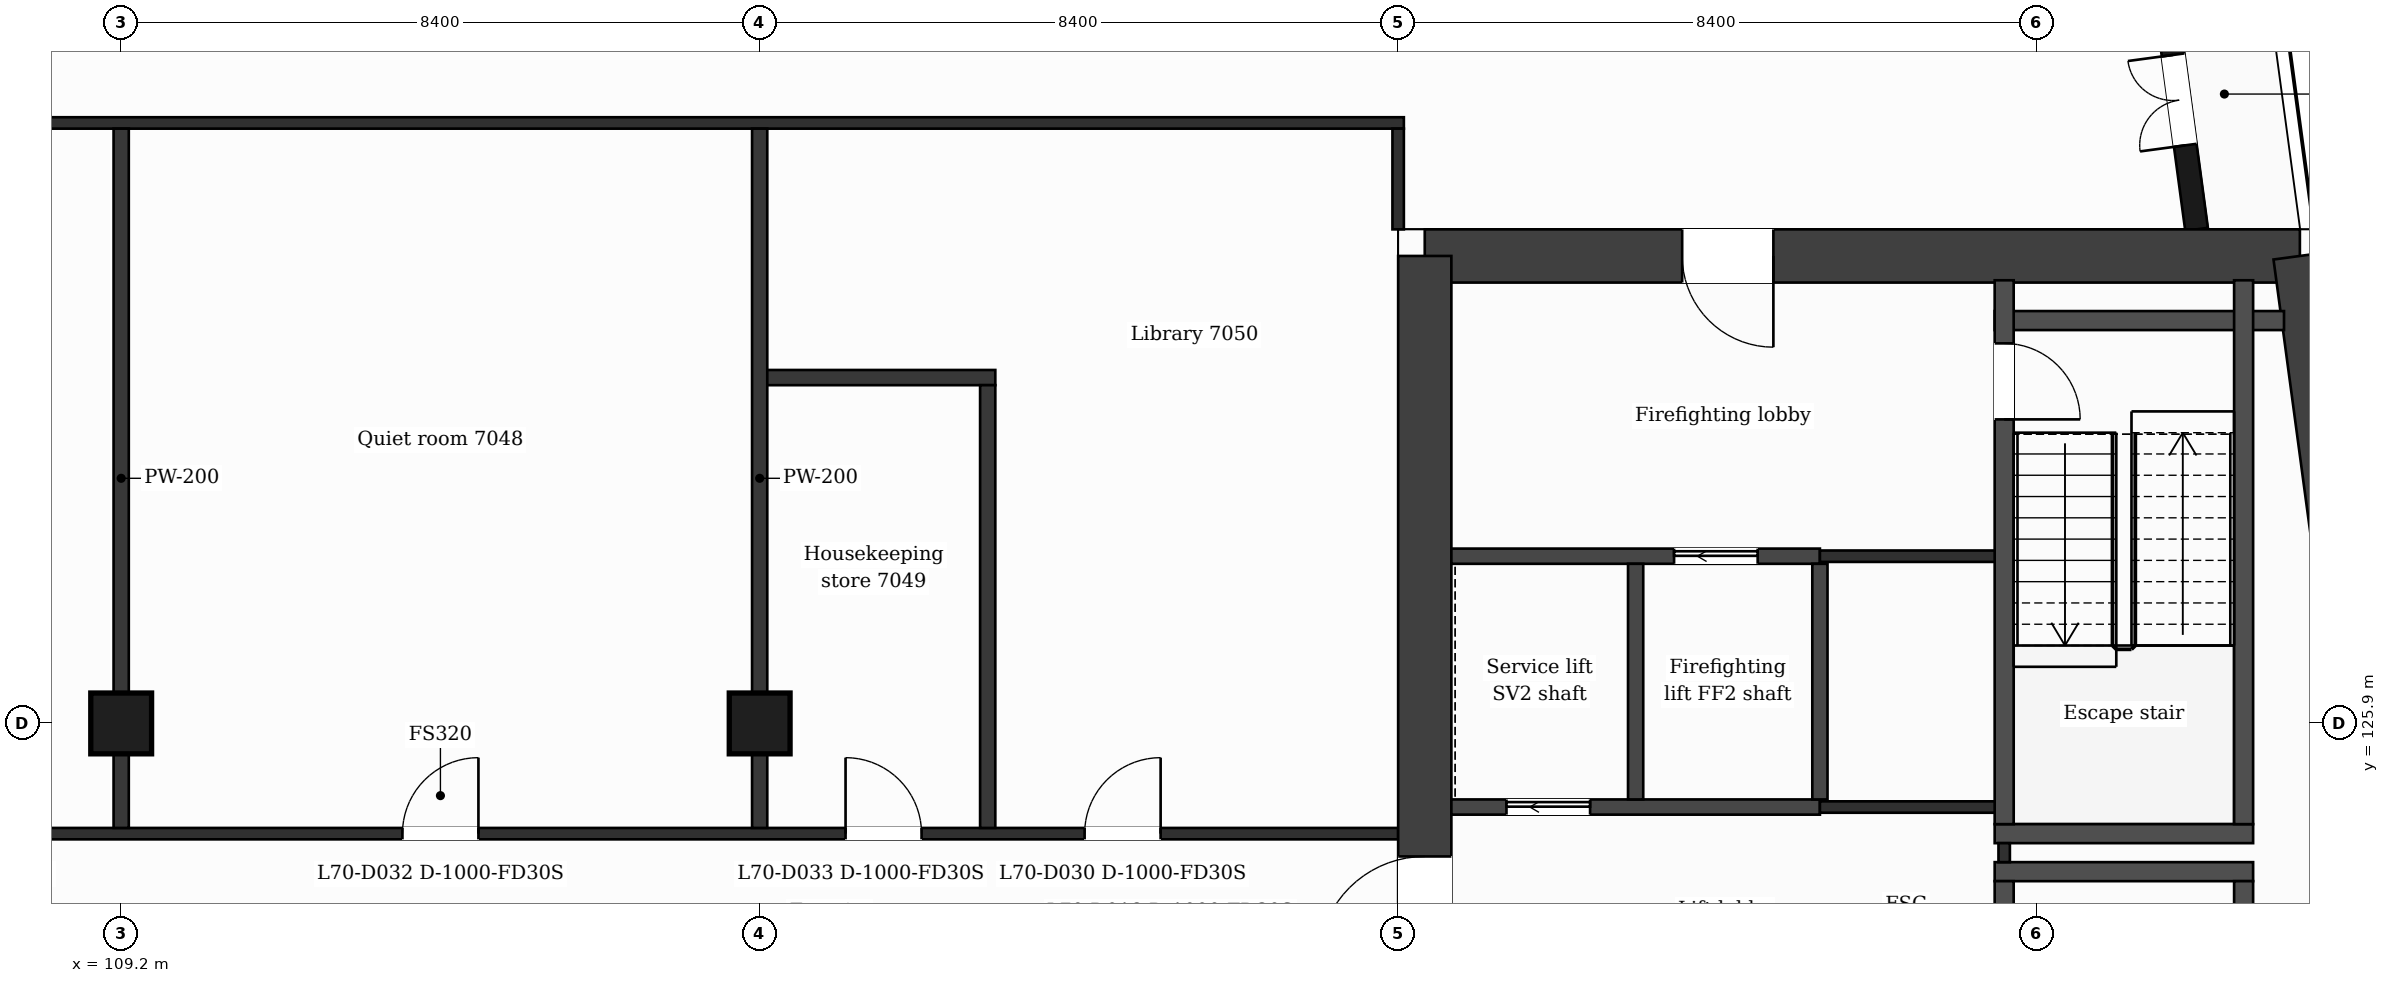
"""IFC4 building model, lengths in metres.
Left out: names, types, materials, properties, quantities, classifications, styles, units other than length and angle.
Written with IfcOpenShell. Run it as: python <this file> out.ifc"""

import sys

from ifc_helpers import new_model, si_unit, direction, frame, frame_2d, origin, origin_2d, place, context, subcontext, project, spatial, rectangle, extrude, element, fill, save


model = new_model("IFC4")
c1 = context("Model", 3, precision=1e-05, world=origin(), true_north=direction((0.0, 1.0)))
c2 = subcontext(c1, "Body", "Model", "MODEL_VIEW")
j1 = project(units=[si_unit("LENGTHUNIT", "METRE"), si_unit("PLANEANGLEUNIT", "RADIAN")], contexts=[c1])
p1 = place(None, origin())
s1 = spatial("IfcSite", under=j1, at=p1, CompositionType="ELEMENT")
p2 = place(p1, origin())
s2 = spatial("IfcBuilding", under=s1, at=p2, CompositionType="ELEMENT")
p3 = place(p2, frame((0.0, 0.0, 288.6)))
s3 = spatial("IfcBuildingStorey", under=s2, at=p3, CompositionType="ELEMENT", Elevation=288.6)
p4 = place(p3, frame((126.35, 132.05, 0.0), z_axis=(0.0, 0.0, 1.0), x_axis=(1.0, 0.0, 0.0)))
e1 = element("IfcWall", 1, at=p4, inside=s3, PredefinedType="SHEAR", context=c2, shape_type="SweptSolid", body=[
    extrude(rectangle(XDim=11.513, YDim=0.7, at=frame_2d((5.757, 0.0))), origin(), (0.0, 0.0, 1.0), 3.7),
])
p5 = place(p4, frame((3.386, 0.0, 0.0)))
e2 = element("IfcOpeningElement", 2, at=p5, cuts=e1, PredefinedType="OPENING", context=c2, shape_type="SweptSolid", body=[
    extrude(rectangle(XDim=1.2, YDim=2.1, at=frame_2d((0.6, 1.05))), frame((0.0, 0.36, 0.0), z_axis=(0.0, -1.0, 0.0), x_axis=(1.0, 0.0, 0.0)), (0.0, 0.0, 1.0), 0.72),
])
p6 = place(p3, frame((137.863, 132.05, 0.0), z_axis=(0.0, 0.0, 1.0), x_axis=(0.133401241494, -0.991062111458, 0.0)))
e3 = element("IfcWall", 3, at=p6, inside=s3, PredefinedType="SHEAR", context=c2, shape_type="SweptSolid", body=[
    extrude(rectangle(XDim=15.842, YDim=0.7, at=frame_2d((7.921, 0.0))), origin(), (0.0, 0.0, 1.0), 3.7),
])
p7 = place(p3, frame((126.35, 116.35, 0.0), z_axis=(0.0, 0.0, 1.0), x_axis=(0.0, 1.0, 0.0)))
e4 = element("IfcWall", 4, at=p7, inside=s3, PredefinedType="SHEAR", context=c2, shape_type="SweptSolid", body=[
    extrude(rectangle(XDim=15.7, YDim=0.7, at=frame_2d((7.85, 0.0))), origin(), (0.0, 0.0, 1.0), 3.7),
])
p8 = place(p7, frame((6.4, 0.0, 0.0)))
e5 = element("IfcOpeningElement", 5, at=p8, cuts=e4, PredefinedType="OPENING", context=c2, shape_type="SweptSolid", body=[
    extrude(rectangle(XDim=1.4, YDim=2.1, at=frame_2d((0.7, 1.05))), frame((0.0, 0.36, 0.0), z_axis=(0.0, -1.0, 0.0), x_axis=(1.0, 0.0, 0.0)), (0.0, 0.0, 1.0), 0.72),
])
for number, where, z_axis, x_axis in (
    (6, (109.2, 125.9, 0.0), (0.0, 0.0, 1.0), (1.0, 0.0, 0.0)),
    (7, (117.6, 125.9, 0.0), (0.0, 0.0, 1.0), (1.0, 0.0, 0.0)),
):
    element("IfcColumn", number, at=place(p3, frame(where, z_axis=z_axis, x_axis=x_axis)), inside=s3, PredefinedType="COLUMN", context=c2, shape_type="SweptSolid", body=[
        extrude(rectangle(XDim=0.8, YDim=0.8, at=origin_2d()), origin(), (0.0, 0.0, 1.0), 3.7),
    ])
p9 = place(p3, frame((136.504, 132.4, 0.0), z_axis=(0.0, 0.0, 1.0), x_axis=(-0.133399697462, 0.99106231929, 0.0)))
e8 = element("IfcWall", 8, at=p9, inside=s3, PredefinedType="SOLIDWALL", context=c2, shape_type="SweptSolid", body=[
    extrude(rectangle(XDim=6.74, YDim=0.3, at=frame_2d((3.37, 0.0))), origin(), (0.0, 0.0, 1.0), 3.38),
])
p10 = place(p9, frame((1.115, 0.0, 0.0)))
e9 = element("IfcOpeningElement", 9, at=p10, cuts=e8, PredefinedType="OPENING", context=c2, shape_type="SweptSolid", body=[
    extrude(rectangle(XDim=1.2, YDim=2.4, at=frame_2d((0.6, 1.2))), frame((0.0, 0.16, 0.0), z_axis=(0.0, -1.0, 0.0), x_axis=(1.0, 0.0, 0.0)), (0.0, 0.0, 1.0), 0.32),
])
p11 = place(p9, frame((3.835, 0.0, 0.9)))
e10 = element("IfcOpeningElement", 10, at=p11, cuts=e8, PredefinedType="OPENING", context=c2, shape_type="SweptSolid", body=[
    extrude(rectangle(XDim=2.4, YDim=2.1, at=frame_2d((1.2, 1.05))), frame((0.0, 0.16, 0.0), z_axis=(0.0, -1.0, 0.0), x_axis=(1.0, 0.0, 0.0)), (0.0, 0.0, 1.0), 0.32),
])
for number, where, z_axis, x_axis in (
    (11, (133.848, 123.95, 0.0), (0.0, 0.0, 1.0), (1.0, 0.0, 0.0)),
    (12, (133.848, 124.45, 0.0), (0.0, 0.0, 1.0), (1.0, 0.0, 0.0)),
):
    element("IfcWall", number, at=place(p3, frame(where, z_axis=z_axis, x_axis=x_axis)), inside=s3, PredefinedType="PARTITIONING", context=c2, shape_type="SweptSolid", body=[
        extrude(rectangle(XDim=3.4, YDim=0.25, at=frame_2d((1.7, 0.0))), origin(), (0.0, 0.0, 1.0), 3.38),
    ])
p12 = place(p3, frame((100.8, 124.45, 0.0), z_axis=(0.0, 0.0, 1.0), x_axis=(1.0, 0.0, 0.0)))
e13 = element("IfcWall", 13, at=p12, inside=s3, PredefinedType="PARTITIONING", context=c2, shape_type="SweptSolid", body=[
    extrude(rectangle(XDim=25.2, YDim=0.15, at=frame_2d((12.6, 0.0))), origin(), (0.0, 0.0, 1.0), 3.38),
])
p13 = place(p12, frame((21.075, 0.0, 0.0)))
e14 = element("IfcOpeningElement", 14, at=p13, cuts=e13, PredefinedType="OPENING", context=c2, shape_type="SweptSolid", body=[
    extrude(rectangle(XDim=1.0, YDim=2.1, at=frame_2d((0.5, 1.05))), frame((0.0, 0.085, 0.0), z_axis=(0.0, -1.0, 0.0), x_axis=(1.0, 0.0, 0.0)), (0.0, 0.0, 1.0), 0.17),
])
p14 = place(p12, frame((5.375, 0.0, 0.0)))
e15 = element("IfcOpeningElement", 15, at=p14, cuts=e13, PredefinedType="OPENING", context=c2, shape_type="SweptSolid", body=[
    extrude(rectangle(XDim=1.0, YDim=2.1, at=frame_2d((0.5, 1.05))), frame((0.0, 0.085, 0.0), z_axis=(0.0, -1.0, 0.0), x_axis=(1.0, 0.0, 0.0)), (0.0, 0.0, 1.0), 0.17),
])
p15 = place(p12, frame((12.1, 0.0, 0.0)))
e16 = element("IfcOpeningElement", 16, at=p15, cuts=e13, PredefinedType="OPENING", context=c2, shape_type="SweptSolid", body=[
    extrude(rectangle(XDim=1.0, YDim=2.1, at=frame_2d((0.5, 1.05))), frame((0.0, 0.085, 0.0), z_axis=(0.0, -1.0, 0.0), x_axis=(1.0, 0.0, 0.0)), (0.0, 0.0, 1.0), 0.17),
])
p16 = place(p12, frame((17.93, 0.0, 0.0)))
e17 = element("IfcOpeningElement", 17, at=p16, cuts=e13, PredefinedType="OPENING", context=c2, shape_type="SweptSolid", body=[
    extrude(rectangle(XDim=1.0, YDim=2.1, at=frame_2d((0.5, 1.05))), frame((0.0, 0.085, 0.0), z_axis=(0.0, -1.0, 0.0), x_axis=(1.0, 0.0, 0.0)), (0.0, 0.0, 1.0), 0.17),
])
p17 = place(p3, frame((126.7, 124.8, 0.0), z_axis=(0.0, 0.0, 1.0), x_axis=(1.0, 0.0, 0.0)))
e18 = element("IfcWall", 18, at=p17, inside=s3, PredefinedType="PARTITIONING", context=c2, shape_type="SweptSolid", body=[
    extrude(rectangle(XDim=4.849, YDim=0.2, at=frame_2d((2.424, 0.0))), origin(), (0.0, 0.0, 1.0), 3.38),
])
p18 = place(p17, frame((0.725, 0.0, 0.0)))
e19 = element("IfcOpeningElement", 19, at=p18, cuts=e18, PredefinedType="OPENING", context=c2, shape_type="SweptSolid", body=[
    extrude(rectangle(XDim=1.1, YDim=2.1, at=frame_2d((0.55, 1.05))), frame((0.0, 0.11, 0.0), z_axis=(0.0, -1.0, 0.0), x_axis=(1.0, 0.0, 0.0)), (0.0, 0.0, 1.0), 0.22),
])
p19 = place(p3, frame((131.549, 124.8, 0.0), z_axis=(0.0, 0.0, 1.0), x_axis=(1.0, 0.0, 0.0)))
e20 = element("IfcWall", 20, at=p19, inside=s3, PredefinedType="PARTITIONING", context=c2, shape_type="SweptSolid", body=[
    extrude(rectangle(XDim=2.549, YDim=0.15, at=frame_2d((1.275, 0.0))), origin(), (0.0, 0.0, 1.0), 3.38),
])
p20 = place(p3, frame((126.7, 128.1, 0.0), z_axis=(0.0, 0.0, 1.0), x_axis=(1.0, 0.0, 0.0)))
e21 = element("IfcWall", 21, at=p20, inside=s3, PredefinedType="PARTITIONING", context=c2, shape_type="SweptSolid", body=[
    extrude(rectangle(XDim=4.849, YDim=0.2, at=frame_2d((2.424, 0.0))), origin(), (0.0, 0.0, 1.0), 3.38),
])
p21 = place(p20, frame((2.93, 0.0, 0.0)))
e22 = element("IfcOpeningElement", 22, at=p21, cuts=e21, PredefinedType="OPENING", context=c2, shape_type="SweptSolid", body=[
    extrude(rectangle(XDim=1.1, YDim=2.1, at=frame_2d((0.55, 1.05))), frame((0.0, 0.11, 0.0), z_axis=(0.0, -1.0, 0.0), x_axis=(1.0, 0.0, 0.0)), (0.0, 0.0, 1.0), 0.22),
])
p22 = place(p3, frame((131.549, 128.1, 0.0), z_axis=(0.0, 0.0, 1.0), x_axis=(1.0, 0.0, 0.0)))
e23 = element("IfcWall", 23, at=p22, inside=s3, PredefinedType="PARTITIONING", context=c2, shape_type="SweptSolid", body=[
    extrude(rectangle(XDim=2.424, YDim=0.15, at=frame_2d((1.212, 0.0))), origin(), (0.0, 0.0, 1.0), 3.38),
])
p23 = place(p3, frame((117.6, 130.45, 0.0), z_axis=(0.0, 0.0, 1.0), x_axis=(1.0, 0.0, 0.0)))
e24 = element("IfcWall", 24, at=p23, inside=s3, PredefinedType="PARTITIONING", context=c2, shape_type="SweptSolid", body=[
    extrude(rectangle(XDim=3.1, YDim=0.2, at=frame_2d((1.55, 0.0))), origin(), (0.0, 0.0, 1.0), 3.38),
])
p24 = place(p3, frame((133.848, 131.2, 0.0), z_axis=(0.0, 0.0, 1.0), x_axis=(1.0, 0.0, 0.0)))
e25 = element("IfcWall", 25, at=p24, inside=s3, PredefinedType="PARTITIONING", context=c2, shape_type="SweptSolid", body=[
    extrude(rectangle(XDim=3.807, YDim=0.25, at=frame_2d((1.903, 0.0))), origin(), (0.0, 0.0, 1.0), 3.38),
])
p25 = place(p3, frame((100.725, 133.8, 0.0), z_axis=(0.0, 0.0, 1.0), x_axis=(1.0, 0.0, 0.0)))
e26 = element("IfcWall", 26, at=p25, inside=s3, PredefinedType="PARTITIONING", context=c2, shape_type="SweptSolid", body=[
    extrude(rectangle(XDim=25.35, YDim=0.15, at=frame_2d((12.675, 0.0))), origin(), (0.0, 0.0, 1.0), 3.38),
])
for number, where, z_axis, x_axis in (
    (27, (109.2, 124.525, 0.0), (0.0, 0.0, 1.0), (0.0, 1.0, 0.0)),
    (28, (117.6, 124.525, 0.0), (0.0, 0.0, 1.0), (0.0, 1.0, 0.0)),
):
    element("IfcWall", number, at=place(p3, frame(where, z_axis=z_axis, x_axis=x_axis)), inside=s3, PredefinedType="PARTITIONING", context=c2, shape_type="SweptSolid", body=[
        extrude(rectangle(XDim=9.2, YDim=0.2, at=frame_2d((4.6, 0.0))), origin(), (0.0, 0.0, 1.0), 3.38),
    ])
p26 = place(p3, frame((120.6, 124.525, 0.0), z_axis=(0.0, 0.0, 1.0), x_axis=(0.0, 1.0, 0.0)))
e29 = element("IfcWall", 29, at=p26, inside=s3, PredefinedType="PARTITIONING", context=c2, shape_type="SweptSolid", body=[
    extrude(rectangle(XDim=5.825, YDim=0.2, at=frame_2d((2.913, 0.0))), origin(), (0.0, 0.0, 1.0), 3.38),
])
p27 = place(p3, frame((126.0, 132.4, 0.0), z_axis=(0.0, 0.0, 1.0), x_axis=(0.0, 1.0, 0.0)))
e30 = element("IfcWall", 30, at=p27, inside=s3, PredefinedType="PARTITIONING", context=c2, shape_type="SweptSolid", body=[
    extrude(rectangle(XDim=1.325, YDim=0.15, at=frame_2d((0.663, 0.0))), origin(), (0.0, 0.0, 1.0), 3.38),
])
for number, where, z_axis, x_axis in (
    (31, (129.124, 124.9, 0.0), (0.0, 0.0, 1.0), (0.0, 1.0, 0.0)),
    (32, (131.549, 124.9, 0.0), (0.0, 0.0, 1.0), (0.0, 1.0, 0.0)),
):
    element("IfcWall", number, at=place(p3, frame(where, z_axis=z_axis, x_axis=x_axis)), inside=s3, PredefinedType="PARTITIONING", context=c2, shape_type="SweptSolid", body=[
        extrude(rectangle(XDim=3.1, YDim=0.2, at=frame_2d((1.55, 0.0))), origin(), (0.0, 0.0, 1.0), 3.38),
    ])
p28 = place(p3, frame((133.973, 124.075, 0.0), z_axis=(0.0, 0.0, 1.0), x_axis=(0.0, 1.0, 0.0)))
e33 = element("IfcWall", 33, at=p28, inside=s3, PredefinedType="PARTITIONING", context=c2, shape_type="SweptSolid", body=[
    extrude(rectangle(XDim=0.25, YDim=0.15, at=frame_2d((0.125, 0.0))), origin(), (0.0, 0.0, 1.0), 3.38),
])
p29 = place(p3, frame((133.973, 116.67, 0.0), z_axis=(0.0, 0.0, 1.0), x_axis=(0.0, 1.0, 0.0)))
e34 = element("IfcWall", 34, at=p29, inside=s3, PredefinedType="PARTITIONING", context=c2, shape_type="SweptSolid", body=[
    extrude(rectangle(XDim=7.155, YDim=0.25, at=frame_2d((3.578, 0.0))), origin(), (0.0, 0.0, 1.0), 3.38),
])
p30 = place(p29, frame((5.855, 0.0, 0.0)))
e35 = element("IfcOpeningElement", 35, at=p30, cuts=e34, PredefinedType="OPENING", context=c2, shape_type="SweptSolid", body=[
    extrude(rectangle(XDim=0.95, YDim=2.1, at=frame_2d((0.475, 1.05))), frame((0.0, 0.135, 0.0), z_axis=(0.0, -1.0, 0.0), x_axis=(1.0, 0.0, 0.0)), (0.0, 0.0, 1.0), 0.27),
])
p31 = place(p3, frame((133.973, 124.575, 0.0), z_axis=(0.0, 0.0, 1.0), x_axis=(0.0, 1.0, 0.0)))
e36 = element("IfcWall", 36, at=p31, inside=s3, PredefinedType="PARTITIONING", context=c2, shape_type="SweptSolid", body=[
    extrude(rectangle(XDim=7.155, YDim=0.25, at=frame_2d((3.578, 0.0))), origin(), (0.0, 0.0, 1.0), 3.38),
])
p32 = place(p31, frame((5.325, 0.0, 0.0)))
e37 = element("IfcOpeningElement", 37, at=p32, cuts=e36, PredefinedType="OPENING", context=c2, shape_type="SweptSolid", body=[
    extrude(rectangle(XDim=1.0, YDim=2.1, at=frame_2d((0.5, 1.05))), frame((0.0, 0.135, 0.0), z_axis=(0.0, -1.0, 0.0), x_axis=(1.0, 0.0, 0.0)), (0.0, 0.0, 1.0), 0.27),
])
for number, where, z_axis, x_axis in (
    (38, (137.123, 116.67, 0.0), (0.0, 0.0, 1.0), (0.0, 1.0, 0.0)),
    (39, (137.123, 124.575, 0.0), (0.0, 0.0, 1.0), (0.0, 1.0, 0.0)),
):
    element("IfcWall", number, at=place(p3, frame(where, z_axis=z_axis, x_axis=x_axis)), inside=s3, PredefinedType="PARTITIONING", context=c2, shape_type="SweptSolid", body=[
        extrude(rectangle(XDim=7.155, YDim=0.25, at=frame_2d((3.578, 0.0))), origin(), (0.0, 0.0, 1.0), 3.38),
    ])
p33 = place(p10, origin())
e40 = element("IfcDoor", 40, at=p33, inside=s3, OperationType="DOUBLE_DOOR_SINGLE_SWING", PredefinedType="DOOR", context=c2, shape_type="SweptSolid", body=[
    extrude(rectangle(XDim=1.2, YDim=2.4, at=frame_2d((0.6, 1.2))), frame((0.0, 0.025, 0.0), z_axis=(0.0, -1.0, 0.0), x_axis=(1.0, 0.0, 0.0)), (0.0, 0.0, 1.0), 0.05),
])
fill(e9, e40)
p34 = place(p21, origin())
e41 = element("IfcDoor", 41, at=p34, inside=s3, OperationType="SLIDING_TO_LEFT", PredefinedType="DOOR", context=c2, shape_type="SweptSolid", body=[
    extrude(rectangle(XDim=1.1, YDim=2.1, at=frame_2d((0.55, 1.05))), frame((0.0, 0.025, 0.0), z_axis=(0.0, -1.0, 0.0), x_axis=(1.0, 0.0, 0.0)), (0.0, 0.0, 1.0), 0.05),
])
fill(e22, e41)
p35 = place(p18, origin())
e42 = element("IfcDoor", 42, at=p35, inside=s3, OperationType="SLIDING_TO_LEFT", PredefinedType="DOOR", context=c2, shape_type="SweptSolid", body=[
    extrude(rectangle(XDim=1.1, YDim=2.1, at=frame_2d((0.55, 1.05))), frame((0.0, 0.025, 0.0), z_axis=(0.0, -1.0, 0.0), x_axis=(1.0, 0.0, 0.0)), (0.0, 0.0, 1.0), 0.05),
])
fill(e19, e42)
p36 = place(p32, origin())
e43 = element("IfcDoor", 43, at=p36, inside=s3, OperationType="SINGLE_SWING_LEFT", PredefinedType="DOOR", context=c2, shape_type="SweptSolid", body=[
    extrude(rectangle(XDim=1.0, YDim=2.1, at=frame_2d((0.5, 1.05))), frame((0.0, 0.025, 0.0), z_axis=(0.0, -1.0, 0.0), x_axis=(1.0, 0.0, 0.0)), (0.0, 0.0, 1.0), 0.05),
])
fill(e37, e43)
p37 = place(p13, origin())
e44 = element("IfcDoor", 44, at=p37, inside=s3, OperationType="SINGLE_SWING_RIGHT", PredefinedType="DOOR", context=c2, shape_type="SweptSolid", body=[
    extrude(rectangle(XDim=1.0, YDim=2.1, at=frame_2d((0.5, 1.05))), frame((0.0, 0.025, 0.0), z_axis=(0.0, -1.0, 0.0), x_axis=(1.0, 0.0, 0.0)), (0.0, 0.0, 1.0), 0.05),
])
fill(e14, e44)
p38 = place(p15, origin())
e45 = element("IfcDoor", 45, at=p38, inside=s3, OperationType="SINGLE_SWING_RIGHT", PredefinedType="DOOR", context=c2, shape_type="SweptSolid", body=[
    extrude(rectangle(XDim=1.0, YDim=2.1, at=frame_2d((0.5, 1.05))), frame((0.0, 0.025, 0.0), z_axis=(0.0, -1.0, 0.0), x_axis=(1.0, 0.0, 0.0)), (0.0, 0.0, 1.0), 0.05),
])
fill(e16, e45)
p39 = place(p16, origin())
e46 = element("IfcDoor", 46, at=p39, inside=s3, OperationType="SINGLE_SWING_LEFT", PredefinedType="DOOR", context=c2, shape_type="SweptSolid", body=[
    extrude(rectangle(XDim=1.0, YDim=2.1, at=frame_2d((0.5, 1.05))), frame((0.0, 0.025, 0.0), z_axis=(0.0, -1.0, 0.0), x_axis=(1.0, 0.0, 0.0)), (0.0, 0.0, 1.0), 0.05),
])
fill(e17, e46)
p40 = place(p5, origin())
e47 = element("IfcDoor", 47, at=p40, inside=s3, OperationType="SINGLE_SWING_RIGHT", PredefinedType="DOOR", context=c2, shape_type="SweptSolid", body=[
    extrude(rectangle(XDim=1.2, YDim=2.1, at=frame_2d((0.6, 1.05))), frame((0.0, 0.025, 0.0), z_axis=(0.0, -1.0, 0.0), x_axis=(1.0, 0.0, 0.0)), (0.0, 0.0, 1.0), 0.05),
])
fill(e2, e47)
p41 = place(p8, origin())
e48 = element("IfcDoor", 48, at=p41, inside=s3, OperationType="SINGLE_SWING_LEFT", PredefinedType="DOOR", context=c2, shape_type="SweptSolid", body=[
    extrude(rectangle(XDim=1.4, YDim=2.1, at=frame_2d((0.7, 1.05))), frame((0.0, 0.025, 0.0), z_axis=(0.0, -1.0, 0.0), x_axis=(1.0, 0.0, 0.0)), (0.0, 0.0, 1.0), 0.05),
])
fill(e5, e48)
save(model, sys.argv[1])
